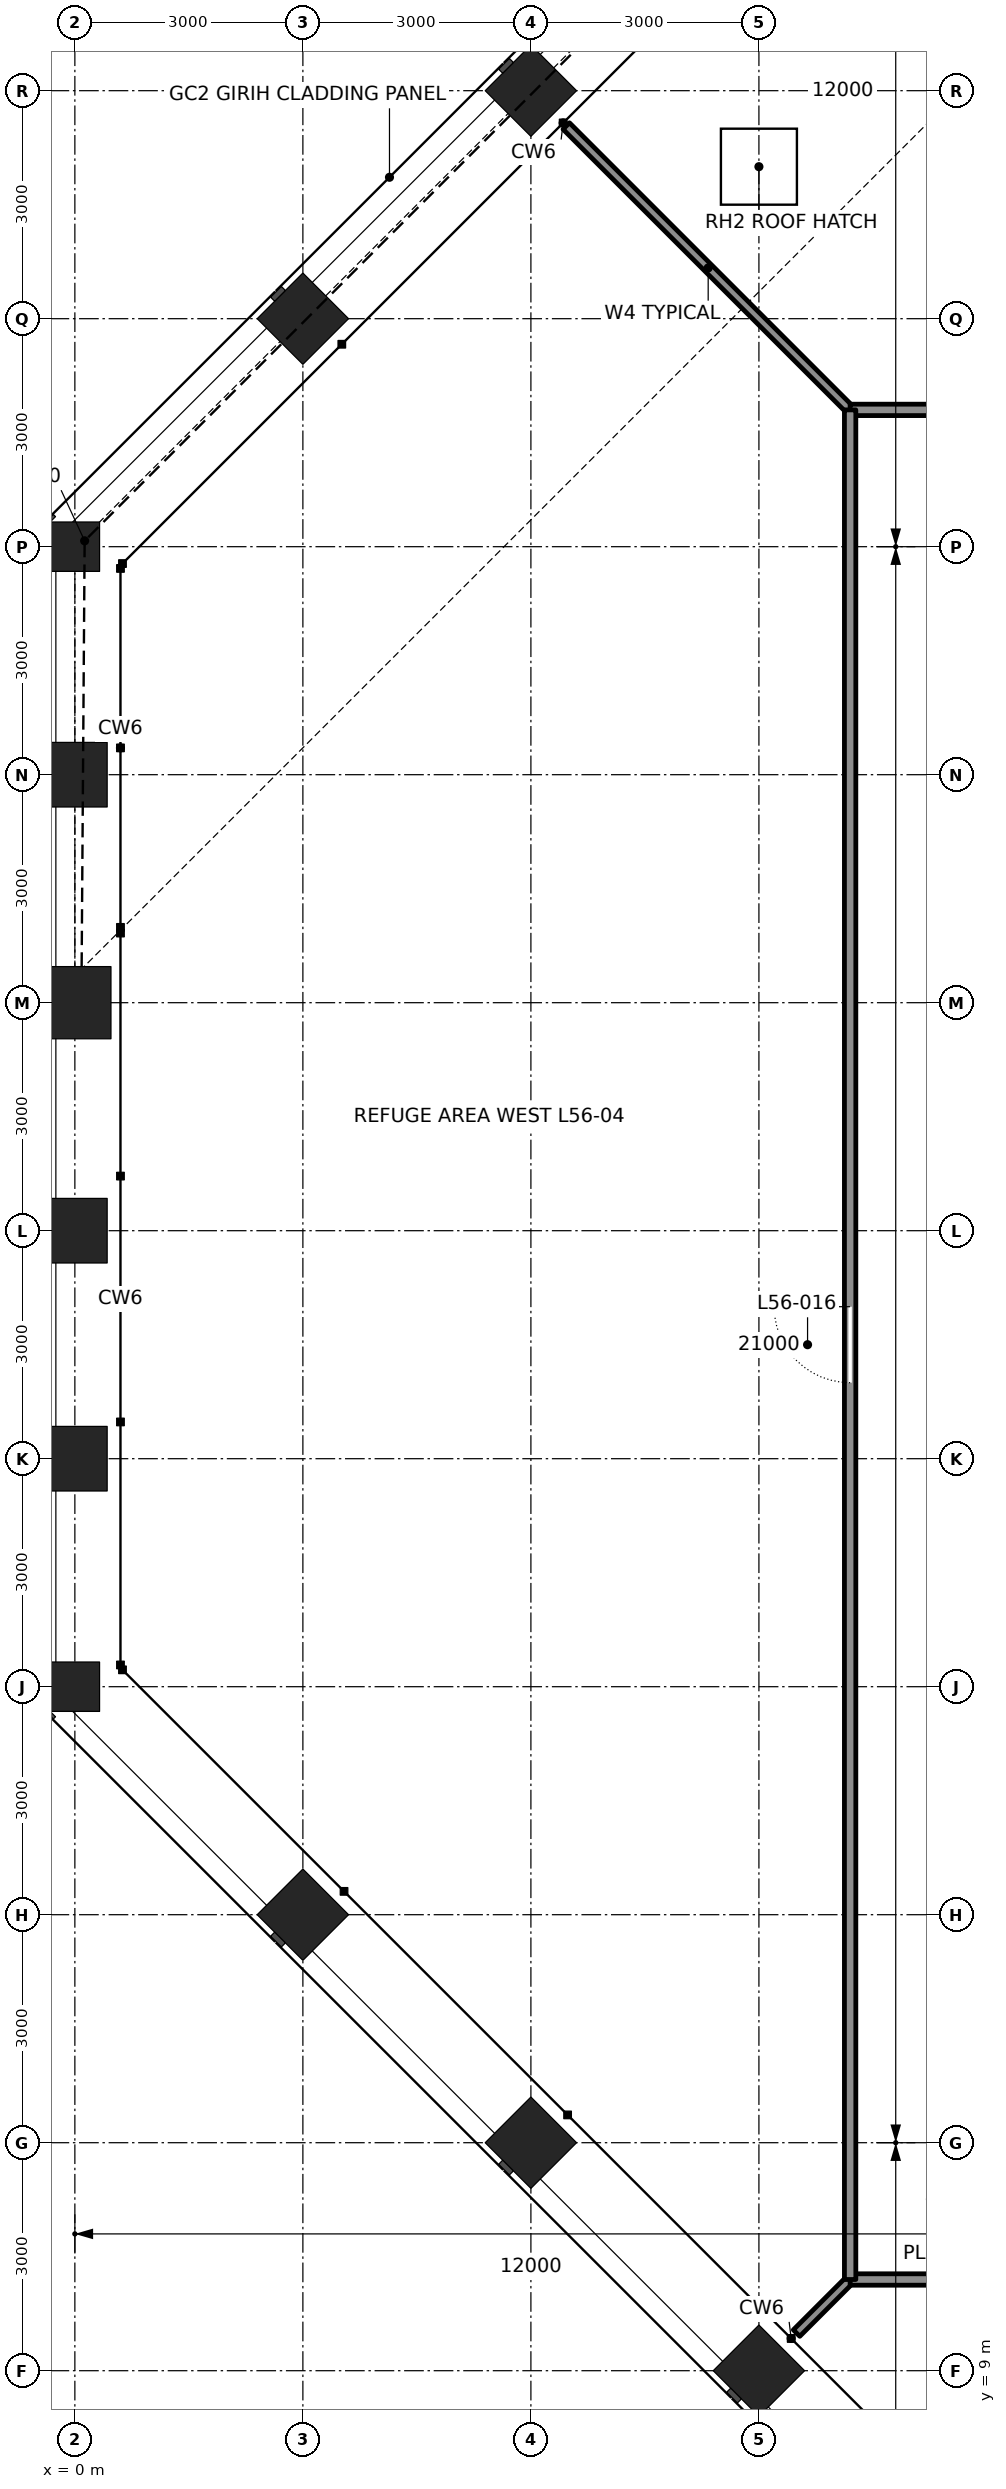
"""IFC4 building model, lengths in metres.
Left out: names, types, materials, properties, quantities, classifications, styles, units other than length and angle.
Written with IfcOpenShell. Run it as: python <this file> out.ifc"""

import sys

from ifc_helpers import new_model, si_unit, direction, frame, frame_2d, origin, origin_2d, place, context, subcontext, project, spatial, rectangle, hollow_rectangle, extrude, element, fill, save


model = new_model("IFC4")
c1 = context("Model", 3, precision=1e-05, world=origin(), true_north=direction((0.0, 1.0)))
c2 = subcontext(c1, "Body", "Model", "MODEL_VIEW")
j1 = project(units=[si_unit("LENGTHUNIT", "METRE"), si_unit("PLANEANGLEUNIT", "RADIAN")], contexts=[c1])
p1 = place(None, origin())
s1 = spatial("IfcSite", under=j1, at=p1, CompositionType="ELEMENT")
p2 = place(p1, origin())
s2 = spatial("IfcBuilding", under=s1, at=p2, CompositionType="ELEMENT")
p3 = place(p2, frame((0.0, 0.0, 251.7)))
s3 = spatial("IfcBuildingStorey", under=s2, at=p3, CompositionType="ELEMENT", Elevation=251.7)
for number, where, z_axis, x_axis in (
    (1, (6.0, 39.0, 0.0), (0.0, 0.0, 1.0), (-0.707, 0.707, 0.0)),
    (2, (3.0, 36.0, 0.0), (0.0, 0.0, 1.0), (-0.707, 0.707, 0.0)),
):
    element("IfcColumn", number, at=place(p3, frame(where, z_axis=z_axis, x_axis=x_axis)), inside=s3, PredefinedType="COLUMN", context=c2, shape_type="SweptSolid", body=[
        extrude(hollow_rectangle(XDim=0.85, YDim=0.85, WallThickness=0.085, at=origin_2d()), origin(), (0.0, 0.0, 1.0), 3.698),
    ])
p4 = place(p3, frame((0.0, 33.0, 0.0), z_axis=(0.0, 0.0, 1.0), x_axis=(-1.0, 0.0, 0.0)))
e3 = element("IfcColumn", 3, at=p4, inside=s3, PredefinedType="COLUMN", context=c2, shape_type="SweptSolid", body=[
    extrude(hollow_rectangle(XDim=0.65, YDim=0.65, WallThickness=0.065, at=origin_2d()), origin(), (0.0, 0.0, 1.0), 3.698),
])
p5 = place(p3, frame((0.0, 30.0, 0.0), z_axis=(0.0, 0.0, 1.0), x_axis=(-1.0, 0.0, 0.0)))
e4 = element("IfcColumn", 4, at=p5, inside=s3, PredefinedType="COLUMN", context=c2, shape_type="SweptSolid", body=[
    extrude(hollow_rectangle(XDim=0.85, YDim=0.85, WallThickness=0.085, at=origin_2d()), origin(), (0.0, 0.0, 1.0), 4.149),
])
p6 = place(p3, frame((0.0, 27.0, 0.0), z_axis=(0.0, 0.0, 1.0), x_axis=(-1.0, 0.0, 0.0)))
e5 = element("IfcColumn", 5, at=p6, inside=s3, PredefinedType="COLUMN", context=c2, shape_type="SweptSolid", body=[
    extrude(hollow_rectangle(XDim=0.95, YDim=0.95, WallThickness=0.11, at=origin_2d()), origin(), (0.0, 0.0, 1.0), 6.0),
])
for number, where, z_axis, x_axis in (
    (6, (0.0, 24.0, 0.0), (0.0, 0.0, 1.0), (-1.0, 0.0, 0.0)),
    (7, (0.0, 21.0, 0.0), (0.0, 0.0, 1.0), (-1.0, 0.0, 0.0)),
):
    element("IfcColumn", number, at=place(p3, frame(where, z_axis=z_axis, x_axis=x_axis)), inside=s3, PredefinedType="COLUMN", context=c2, shape_type="SweptSolid", body=[
        extrude(hollow_rectangle(XDim=0.85, YDim=0.85, WallThickness=0.085, at=origin_2d()), origin(), (0.0, 0.0, 1.0), 6.0),
    ])
p7 = place(p3, frame((0.0, 18.0, 0.0), z_axis=(0.0, 0.0, 1.0), x_axis=(-1.0, 0.0, 0.0)))
e8 = element("IfcColumn", 8, at=p7, inside=s3, PredefinedType="COLUMN", context=c2, shape_type="SweptSolid", body=[
    extrude(hollow_rectangle(XDim=0.65, YDim=0.65, WallThickness=0.065, at=origin_2d()), origin(), (0.0, 0.0, 1.0), 6.0),
])
for number, where, z_axis, x_axis in (
    (9, (3.0, 15.0, 0.0), (0.0, 0.0, 1.0), (-0.707, -0.707, 0.0)),
    (10, (6.0, 12.0, 0.0), (0.0, 0.0, 1.0), (-0.707, -0.707, 0.0)),
    (11, (9.0, 9.0, 0.0), (0.0, 0.0, 1.0), (-0.707, -0.707, 0.0)),
):
    element("IfcColumn", number, at=place(p3, frame(where, z_axis=z_axis, x_axis=x_axis)), inside=s3, PredefinedType="COLUMN", context=c2, shape_type="SweptSolid", body=[
        extrude(hollow_rectangle(XDim=0.85, YDim=0.85, WallThickness=0.085, at=origin_2d()), origin(), (0.0, 0.0, 1.0), 6.0),
    ])
p8 = place(p3, frame((10.2, 34.8, 0.0), z_axis=(0.0, 0.0, 1.0), x_axis=(-0.707106781187, 0.707106781187, 0.0)))
e12 = element("IfcWall", 12, at=p8, inside=s3, PredefinedType="PARTITIONING", context=c2, shape_type="SweptSolid", body=[
    extrude(rectangle(XDim=5.282, YDim=0.12, at=frame_2d((2.641, 0.0))), origin(), (0.0, 0.0, 1.0), 5.84),
])
p9 = place(p3, frame((10.2, 10.2, 0.0), z_axis=(0.0, 0.0, 1.0), x_axis=(-0.707106781187, -0.707106781187, 0.0)))
e13 = element("IfcWall", 13, at=p9, inside=s3, PredefinedType="PARTITIONING", context=c2, shape_type="SweptSolid", body=[
    extrude(rectangle(XDim=0.997, YDim=0.12, at=frame_2d((0.499, 0.0))), origin(), (0.0, 0.0, 1.0), 5.84),
])
p10 = place(p3, frame((10.2, 10.2, 0.0), z_axis=(0.0, 0.0, 1.0), x_axis=(1.0, 0.0, 0.0)))
e14 = element("IfcWall", 14, at=p10, inside=s3, PredefinedType="PARTITIONING", context=c2, shape_type="SweptSolid", body=[
    extrude(rectangle(XDim=24.6, YDim=0.15, at=frame_2d((12.3, 0.0))), origin(), (0.0, 0.0, 1.0), 5.84),
])
p11 = place(p10, frame((11.8, 0.0, 0.0)))
e15 = element("IfcOpeningElement", 15, at=p11, cuts=e14, PredefinedType="OPENING", context=c2, shape_type="SweptSolid", body=[
    extrude(rectangle(XDim=1.0, YDim=2.4, at=frame_2d((0.5, 1.2))), frame((0.0, 0.085, 0.0), z_axis=(0.0, -1.0, 0.0), x_axis=(1.0, 0.0, 0.0)), (0.0, 0.0, 1.0), 0.17),
])
p12 = place(p3, frame((10.2, 34.8, 0.0), z_axis=(0.0, 0.0, 1.0), x_axis=(1.0, 0.0, 0.0)))
e16 = element("IfcWall", 16, at=p12, inside=s3, PredefinedType="PARTITIONING", context=c2, shape_type="SweptSolid", body=[
    extrude(rectangle(XDim=24.6, YDim=0.15, at=frame_2d((12.3, 0.0))), origin(), (0.0, 0.0, 1.0), 5.84),
])
p13 = place(p12, frame((11.8, 0.0, 0.0)))
e17 = element("IfcOpeningElement", 17, at=p13, cuts=e16, PredefinedType="OPENING", context=c2, shape_type="SweptSolid", body=[
    extrude(rectangle(XDim=1.0, YDim=2.4, at=frame_2d((0.5, 1.2))), frame((0.0, 0.085, 0.0), z_axis=(0.0, -1.0, 0.0), x_axis=(1.0, 0.0, 0.0)), (0.0, 0.0, 1.0), 0.17),
])
p14 = place(p3, frame((10.2, 10.2, 0.0), z_axis=(0.0, 0.0, 1.0), x_axis=(0.0, 1.0, 0.0)))
e18 = element("IfcWall", 18, at=p14, inside=s3, PredefinedType="PARTITIONING", context=c2, shape_type="SweptSolid", body=[
    extrude(rectangle(XDim=24.6, YDim=0.15, at=frame_2d((12.3, 0.0))), origin(), (0.0, 0.0, 1.0), 5.84),
])
p15 = place(p14, frame((11.8, 0.0, 0.0)))
e19 = element("IfcOpeningElement", 19, at=p15, cuts=e18, PredefinedType="OPENING", context=c2, shape_type="SweptSolid", body=[
    extrude(rectangle(XDim=1.0, YDim=2.4, at=frame_2d((0.5, 1.2))), frame((0.0, 0.085, 0.0), z_axis=(0.0, -1.0, 0.0), x_axis=(1.0, 0.0, 0.0)), (0.0, 0.0, 1.0), 0.17),
])
p16 = place(p3, frame((9.0, 38.0, 5.195)))
p17 = place(p16, frame((0.0, 0.0, 0.454)))
e20 = element("IfcDoor", 20, at=p17, inside=s3, OperationType="SINGLE_SWING_LEFT", PredefinedType="TRAPDOOR", context=c2, shape_type="SweptSolid", body=[
    extrude(rectangle(XDim=1.0, YDim=1.0, at=origin_2d()), origin(), (0.0, 0.0, 1.0), 0.05),
])
p18 = place(p15, origin())
e21 = element("IfcDoor", 21, at=p18, inside=s3, OperationType="SINGLE_SWING_RIGHT", PredefinedType="DOOR", context=c2, shape_type="SweptSolid", body=[
    extrude(rectangle(XDim=1.0, YDim=2.4, at=frame_2d((0.5, 1.2))), frame((0.0, 0.025, 0.0), z_axis=(0.0, -1.0, 0.0), x_axis=(1.0, 0.0, 0.0)), (0.0, 0.0, 1.0), 0.05),
])
fill(e19, e21)
save(model, sys.argv[1])
